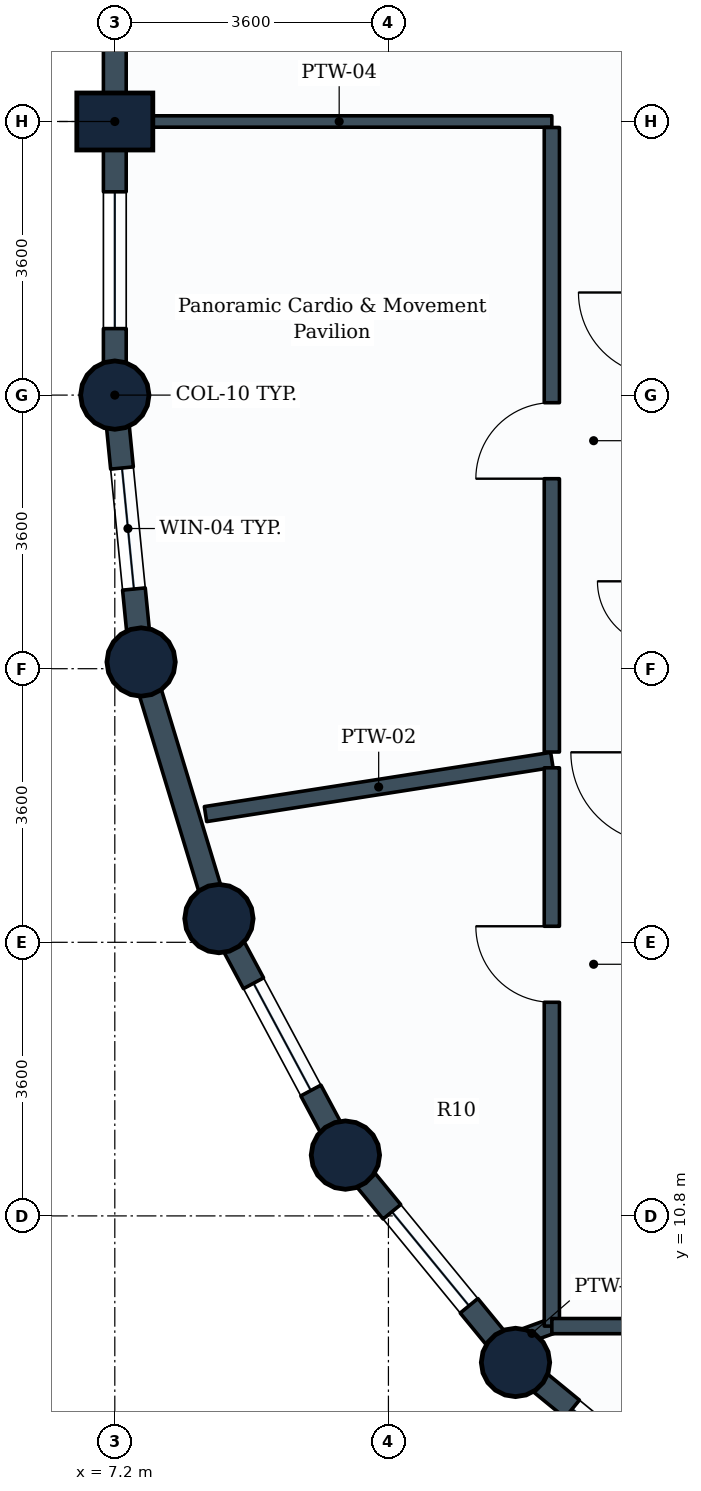
"""IFC4 building model, lengths in metres.
Left out: names, types, materials, properties, quantities, classifications, styles, units other than length and angle.
Written with IfcOpenShell. Run it as: python <this file> out.ifc"""

import sys

from ifc_helpers import new_model, si_unit, direction, frame, frame_2d, origin, origin_2d, place, context, subcontext, project, spatial, rectangle, circle, extrude, element, fill, save


model = new_model("IFC4")
c1 = context("Model", 3, precision=1e-05, world=origin(), true_north=direction((0.0, 1.0)))
c2 = subcontext(c1, "Body", "Model", "MODEL_VIEW")
j1 = project(units=[si_unit("LENGTHUNIT", "METRE"), si_unit("PLANEANGLEUNIT", "RADIAN")], contexts=[c1])
p1 = place(None, origin())
s1 = spatial("IfcSite", under=j1, at=p1, CompositionType="ELEMENT")
p2 = place(p1, origin())
s2 = spatial("IfcBuilding", under=s1, at=p2, CompositionType="ELEMENT")
p3 = place(p2, frame((0.0, 0.0, 150.4)))
s3 = spatial("IfcBuildingStorey", under=s2, at=p3, CompositionType="ELEMENT", Elevation=150.4)
p4 = place(p3, frame((7.2, 21.6, 0.0), z_axis=(0.0, 0.0, 1.0), x_axis=(1.0, 0.0, 0.0)))
e1 = element("IfcColumn", 1, at=p4, inside=s3, PredefinedType="COLUMN", context=c2, shape_type="SweptSolid", body=[
    extrude(circle(Radius=0.45, at=origin_2d()), origin(), (0.0, 0.0, 1.0), 3.8),
])
p5 = place(p3, frame((7.2, 25.2, 0.0), z_axis=(0.0, 0.0, 1.0), x_axis=(0.0, 1.0, 0.0)))
e2 = element("IfcColumn", 2, at=p5, inside=s3, PredefinedType="COLUMN", context=c2, shape_type="SweptSolid", body=[
    extrude(rectangle(XDim=0.75, YDim=1.0, at=origin_2d()), origin(), (0.0, 0.0, 1.0), 3.8),
])
for number, where, z_axis, x_axis in (
    (3, (7.546, 18.088, 0.0), (0.0, 0.0, 1.0), (1.0, 0.0, 0.0)),
    (4, (8.57, 14.712, 0.0), (0.0, 0.0, 1.0), (1.0, 0.0, 0.0)),
    (5, (10.234, 11.6, 0.0), (0.0, 0.0, 1.0), (1.0, 0.0, 0.0)),
    (6, (12.472, 8.872, 0.0), (0.0, 0.0, 1.0), (1.0, 0.0, 0.0)),
):
    element("IfcColumn", number, at=place(p3, frame(where, z_axis=z_axis, x_axis=x_axis)), inside=s3, PredefinedType="COLUMN", context=c2, shape_type="SweptSolid", body=[
        extrude(circle(Radius=0.45, at=origin_2d()), origin(), (0.0, 0.0, 1.0), 3.8),
    ])
p6 = place(p3, frame((7.2, 25.2, 0.0), z_axis=(0.0, 0.0, 1.0), x_axis=(0.0, 1.0, 0.0)))
e7 = element("IfcWall", 7, at=p6, inside=s3, PredefinedType="STANDARD", context=c2, shape_type="SweptSolid", body=[
    extrude(rectangle(XDim=3.6, YDim=0.3, at=frame_2d((1.8, 0.0))), origin(), (0.0, 0.0, 1.0), 2.93),
])
p7 = place(p3, frame((7.2, 21.6, 0.0), z_axis=(0.0, 0.0, 1.0), x_axis=(0.0, 1.0, 0.0)))
e8 = element("IfcWall", 8, at=p7, inside=s3, PredefinedType="STANDARD", context=c2, shape_type="SweptSolid", body=[
    extrude(rectangle(XDim=3.6, YDim=0.3, at=frame_2d((1.8, 0.0))), origin(), (0.0, 0.0, 1.0), 2.93),
])
p8 = place(p7, frame((0.875, 0.0, 0.85)))
e9 = element("IfcOpeningElement", 9, at=p8, cuts=e8, PredefinedType="OPENING", context=c2, shape_type="SweptSolid", body=[
    extrude(rectangle(XDim=1.8, YDim=1.35, at=frame_2d((0.9, 0.675))), frame((0.0, 0.16, 0.0), z_axis=(0.0, -1.0, 0.0), x_axis=(1.0, 0.0, 0.0)), (0.0, 0.0, 1.0), 0.32),
])
p9 = place(p3, frame((7.546, 18.088, 0.0), z_axis=(0.0, 0.0, 1.0), x_axis=(-0.09802417461, 0.995184033831, 0.0)))
e10 = element("IfcWall", 10, at=p9, inside=s3, PredefinedType="STANDARD", context=c2, shape_type="SweptSolid", body=[
    extrude(rectangle(XDim=3.529, YDim=0.3, at=frame_2d((1.765, 0.0))), origin(), (0.0, 0.0, 1.0), 2.93),
])
p10 = place(p9, frame((0.965, 0.0, 0.85)))
e11 = element("IfcOpeningElement", 11, at=p10, cuts=e10, PredefinedType="OPENING", context=c2, shape_type="SweptSolid", body=[
    extrude(rectangle(XDim=1.6, YDim=1.35, at=frame_2d((0.8, 0.675))), frame((0.0, 0.16, 0.0), z_axis=(0.0, -1.0, 0.0), x_axis=(1.0, 0.0, 0.0)), (0.0, 0.0, 1.0), 0.32),
])
p11 = place(p3, frame((8.57, 14.712, 0.0), z_axis=(0.0, 0.0, 1.0), x_axis=(-0.290305086481, 0.956934144423, 0.0)))
e12 = element("IfcWall", 12, at=p11, inside=s3, PredefinedType="STANDARD", context=c2, shape_type="SweptSolid", body=[
    extrude(rectangle(XDim=3.528, YDim=0.3, at=frame_2d((1.764, 0.0))), origin(), (0.0, 0.0, 1.0), 2.93),
])
p12 = place(p3, frame((10.234, 11.6, 0.0), z_axis=(0.0, 0.0, 1.0), x_axis=(-0.47151087309, 0.881860247748, 0.0)))
e13 = element("IfcWall", 13, at=p12, inside=s3, PredefinedType="STANDARD", context=c2, shape_type="SweptSolid", body=[
    extrude(rectangle(XDim=3.529, YDim=0.3, at=frame_2d((1.764, 0.0))), origin(), (0.0, 0.0, 1.0), 2.93),
])
p13 = place(p12, frame((0.964, 0.0, 0.85)))
e14 = element("IfcOpeningElement", 14, at=p13, cuts=e13, PredefinedType="OPENING", context=c2, shape_type="SweptSolid", body=[
    extrude(rectangle(XDim=1.6, YDim=1.35, at=frame_2d((0.8, 0.675))), frame((0.0, 0.16, 0.0), z_axis=(0.0, -1.0, 0.0), x_axis=(1.0, 0.0, 0.0)), (0.0, 0.0, 1.0), 0.32),
])
p14 = place(p3, frame((12.472, 8.872, 0.0), z_axis=(0.0, 0.0, 1.0), x_axis=(-0.634258295121, 0.773121216285, 0.0)))
e15 = element("IfcWall", 15, at=p14, inside=s3, PredefinedType="STANDARD", context=c2, shape_type="SweptSolid", body=[
    extrude(rectangle(XDim=3.529, YDim=0.3, at=frame_2d((1.764, 0.0))), origin(), (0.0, 0.0, 1.0), 2.93),
])
p15 = place(p14, frame((0.964, 0.0, 0.85)))
e16 = element("IfcOpeningElement", 16, at=p15, cuts=e15, PredefinedType="OPENING", context=c2, shape_type="SweptSolid", body=[
    extrude(rectangle(XDim=1.6, YDim=1.35, at=frame_2d((0.8, 0.675))), frame((0.0, 0.16, 0.0), z_axis=(0.0, -1.0, 0.0), x_axis=(1.0, 0.0, 0.0)), (0.0, 0.0, 1.0), 0.32),
])
p16 = place(p3, frame((15.2, 6.634, 0.0), z_axis=(0.0, 0.0, 1.0), x_axis=(-0.773121216285, 0.634258295121, 0.0)))
e17 = element("IfcWall", 17, at=p16, inside=s3, PredefinedType="STANDARD", context=c2, shape_type="SweptSolid", body=[
    extrude(rectangle(XDim=3.529, YDim=0.3, at=frame_2d((1.764, 0.0))), origin(), (0.0, 0.0, 1.0), 2.93),
])
p17 = place(p16, frame((0.964, 0.0, 0.85)))
e18 = element("IfcOpeningElement", 18, at=p17, cuts=e17, PredefinedType="OPENING", context=c2, shape_type="SweptSolid", body=[
    extrude(rectangle(XDim=1.6, YDim=1.35, at=frame_2d((0.8, 0.675))), frame((0.0, 0.16, 0.0), z_axis=(0.0, -1.0, 0.0), x_axis=(1.0, 0.0, 0.0)), (0.0, 0.0, 1.0), 0.32),
])
p18 = place(p3, frame((7.354, 25.2, 0.0), z_axis=(0.0, 0.0, 1.0), x_axis=(1.0, 0.0, 0.0)))
e19 = element("IfcWall", 19, at=p18, inside=s3, PredefinedType="PARTITIONING", context=c2, shape_type="SweptSolid", body=[
    extrude(rectangle(XDim=5.596, YDim=0.15, at=frame_2d((2.798, 0.0))), origin(), (0.0, 0.0, 1.0), 3.535),
])
p19 = place(p3, frame((12.95, 16.8, 0.0), z_axis=(0.0, 0.0, 1.0), x_axis=(-0.987973652082, -0.154622323068, 0.0)))
e20 = element("IfcWall", 20, at=p19, inside=s3, PredefinedType="PARTITIONING", context=c2, shape_type="SweptSolid", body=[
    extrude(rectangle(XDim=4.612, YDim=0.2, at=frame_2d((2.306, 0.0))), origin(), (0.0, 0.0, 1.0), 2.93),
])
p20 = place(p3, frame((12.95, 9.35, 0.0), z_axis=(0.0, 0.0, 1.0), x_axis=(-0.939538101119, -0.342444384601, 0.0)))
e21 = element("IfcWall", 21, at=p20, inside=s3, PredefinedType="PARTITIONING", context=c2, shape_type="SweptSolid", body=[
    extrude(rectangle(XDim=0.559, YDim=0.2, at=frame_2d((0.279, 0.0))), origin(), (0.0, 0.0, 1.0), 2.93),
])
p21 = place(p3, frame((12.95, 16.904, 0.0), z_axis=(0.0, 0.0, 1.0), x_axis=(0.0, 1.0, 0.0)))
e22 = element("IfcWall", 22, at=p21, inside=s3, PredefinedType="PARTITIONING", context=c2, shape_type="SweptSolid", body=[
    extrude(rectangle(XDim=8.217, YDim=0.2, at=frame_2d((4.108, 0.0))), origin(), (0.0, 0.0, 1.0), 3.18),
])
p22 = place(p21, frame((3.596, 0.0, 0.0)))
e23 = element("IfcOpeningElement", 23, at=p22, cuts=e22, PredefinedType="OPENING", context=c2, shape_type="SweptSolid", body=[
    extrude(rectangle(XDim=1.0, YDim=2.1, at=frame_2d((0.5, 1.05))), frame((0.0, 0.11, 0.0), z_axis=(0.0, -1.0, 0.0), x_axis=(1.0, 0.0, 0.0)), (0.0, 0.0, 1.0), 0.22),
])
p23 = place(p3, frame((12.95, 9.35, 0.0), z_axis=(0.0, 0.0, 1.0), x_axis=(0.0, 1.0, 0.0)))
e24 = element("IfcWall", 24, at=p23, inside=s3, PredefinedType="PARTITIONING", context=c2, shape_type="SweptSolid", body=[
    extrude(rectangle(XDim=7.346, YDim=0.2, at=frame_2d((3.673, 0.0))), origin(), (0.0, 0.0, 1.0), 3.17),
])
p24 = place(p23, frame((4.261, 0.0, 0.0)))
e25 = element("IfcOpeningElement", 25, at=p24, cuts=e24, PredefinedType="OPENING", context=c2, shape_type="SweptSolid", body=[
    extrude(rectangle(XDim=1.0, YDim=2.1, at=frame_2d((0.5, 1.05))), frame((0.0, 0.11, 0.0), z_axis=(0.0, -1.0, 0.0), x_axis=(1.0, 0.0, 0.0)), (0.0, 0.0, 1.0), 0.22),
])
p25 = place(p3, frame((12.95, 9.35, 0.0), z_axis=(0.0, 0.0, 1.0), x_axis=(1.0, 0.0, 0.0)))
e26 = element("IfcWall", 26, at=p25, inside=s3, PredefinedType="PARTITIONING", context=c2, shape_type="SweptSolid", body=[
    extrude(rectangle(XDim=7.346, YDim=0.2, at=frame_2d((3.673, 0.0))), origin(), (0.0, 0.0, 1.0), 3.18),
])
p26 = place(p25, frame((4.261, 0.0, 0.0)))
e27 = element("IfcOpeningElement", 27, at=p26, cuts=e26, PredefinedType="OPENING", context=c2, shape_type="SweptSolid", body=[
    extrude(rectangle(XDim=1.0, YDim=2.1, at=frame_2d((0.5, 1.05))), frame((0.0, 0.11, 0.0), z_axis=(0.0, -1.0, 0.0), x_axis=(1.0, 0.0, 0.0)), (0.0, 0.0, 1.0), 0.22),
])
p27 = place(p8, origin())
e28 = element("IfcWindow", 28, at=p27, inside=s3, PartitioningType="SINGLE_PANEL", PredefinedType="WINDOW", context=c2, shape_type="SweptSolid", body=[
    extrude(rectangle(XDim=1.8, YDim=1.35, at=frame_2d((0.9, 0.675))), frame((0.0, 0.03, 0.0), z_axis=(0.0, -1.0, 0.0), x_axis=(1.0, 0.0, 0.0)), (0.0, 0.0, 1.0), 0.06),
])
fill(e9, e28)
p28 = place(p10, origin())
e29 = element("IfcWindow", 29, at=p28, inside=s3, PartitioningType="SINGLE_PANEL", PredefinedType="WINDOW", context=c2, shape_type="SweptSolid", body=[
    extrude(rectangle(XDim=1.6, YDim=1.35, at=frame_2d((0.8, 0.675))), frame((0.0, 0.03, 0.0), z_axis=(0.0, -1.0, 0.0), x_axis=(1.0, 0.0, 0.0)), (0.0, 0.0, 1.0), 0.06),
])
fill(e11, e29)
p29 = place(p13, origin())
e30 = element("IfcWindow", 30, at=p29, inside=s3, PartitioningType="SINGLE_PANEL", PredefinedType="WINDOW", context=c2, shape_type="SweptSolid", body=[
    extrude(rectangle(XDim=1.6, YDim=1.35, at=frame_2d((0.8, 0.675))), frame((0.0, 0.03, 0.0), z_axis=(0.0, -1.0, 0.0), x_axis=(1.0, 0.0, 0.0)), (0.0, 0.0, 1.0), 0.06),
])
fill(e14, e30)
p30 = place(p15, origin())
e31 = element("IfcWindow", 31, at=p30, inside=s3, PartitioningType="SINGLE_PANEL", PredefinedType="WINDOW", context=c2, shape_type="SweptSolid", body=[
    extrude(rectangle(XDim=1.6, YDim=1.35, at=frame_2d((0.8, 0.675))), frame((0.0, 0.03, 0.0), z_axis=(0.0, -1.0, 0.0), x_axis=(1.0, 0.0, 0.0)), (0.0, 0.0, 1.0), 0.06),
])
fill(e16, e31)
p31 = place(p17, origin())
e32 = element("IfcWindow", 32, at=p31, inside=s3, PartitioningType="SINGLE_PANEL", PredefinedType="WINDOW", context=c2, shape_type="SweptSolid", body=[
    extrude(rectangle(XDim=1.6, YDim=1.35, at=frame_2d((0.8, 0.675))), frame((0.0, 0.03, 0.0), z_axis=(0.0, -1.0, 0.0), x_axis=(1.0, 0.0, 0.0)), (0.0, 0.0, 1.0), 0.06),
])
fill(e18, e32)
p32 = place(p22, origin())
e33 = element("IfcDoor", 33, at=p32, inside=s3, OperationType="SINGLE_SWING_LEFT", PredefinedType="DOOR", context=c2, shape_type="SweptSolid", body=[
    extrude(rectangle(XDim=1.0, YDim=2.1, at=frame_2d((0.5, 1.05))), frame((0.0, 0.025, 0.0), z_axis=(0.0, -1.0, 0.0), x_axis=(1.0, 0.0, 0.0)), (0.0, 0.0, 1.0), 0.05),
])
fill(e23, e33)
p33 = place(p24, origin())
e34 = element("IfcDoor", 34, at=p33, inside=s3, OperationType="SINGLE_SWING_RIGHT", PredefinedType="DOOR", context=c2, shape_type="SweptSolid", body=[
    extrude(rectangle(XDim=1.0, YDim=2.1, at=frame_2d((0.5, 1.05))), frame((0.0, 0.025, 0.0), z_axis=(0.0, -1.0, 0.0), x_axis=(1.0, 0.0, 0.0)), (0.0, 0.0, 1.0), 0.05),
])
fill(e25, e34)
save(model, sys.argv[1])
